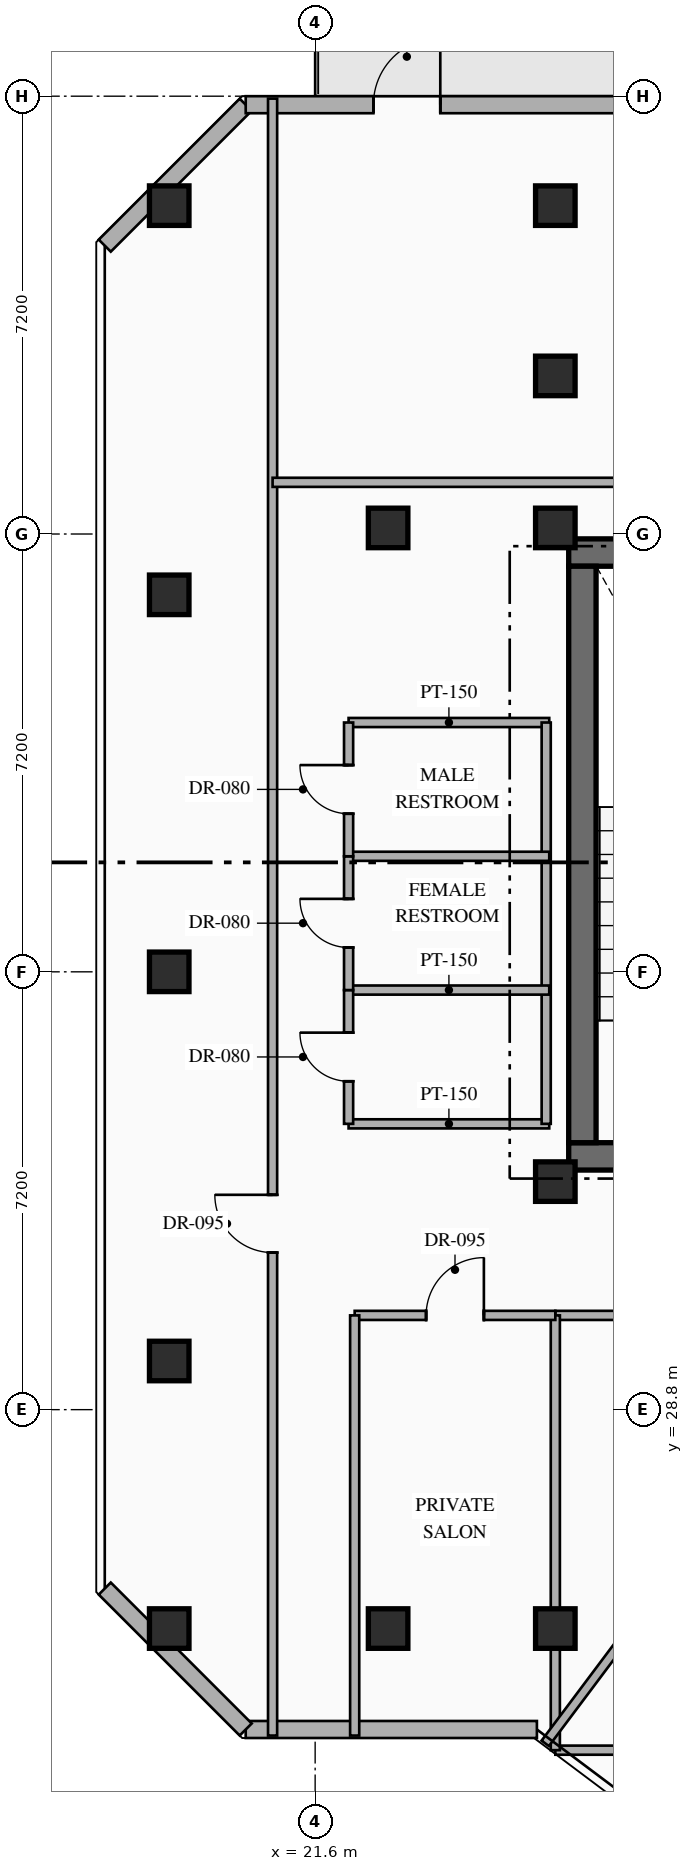
"""IFC4 building model, lengths in metres.
Left out: names, types, materials, properties, quantities, classifications, styles, units other than length and angle.
Written with IfcOpenShell. Run it as: python <this file> out.ifc"""

import sys

from ifc_helpers import new_model, si_unit, direction, frame, frame_2d, origin, origin_2d, place, context, subcontext, project, spatial, rectangle, hollow_rectangle, extrude, element, fill, save


model = new_model("IFC4")
c1 = context("Model", 3, precision=1e-05, world=origin(), true_north=direction((0.0, 1.0)))
c2 = subcontext(c1, "Body", "Model", "MODEL_VIEW")
j1 = project(units=[si_unit("LENGTHUNIT", "METRE"), si_unit("PLANEANGLEUNIT", "RADIAN")], contexts=[c1])
p1 = place(None, origin())
s1 = spatial("IfcSite", under=j1, at=p1, CompositionType="ELEMENT")
p2 = place(p1, origin())
s2 = spatial("IfcBuilding", under=s1, at=p2, CompositionType="ELEMENT")
p3 = place(p2, frame((0.0, 0.0, 239.55)))
s3 = spatial("IfcBuildingStorey", under=s2, at=p3, CompositionType="ELEMENT", Elevation=239.55)
p4 = place(p3, frame((25.77, 32.965, 0.0), z_axis=(0.0, 0.0, 1.0), x_axis=(1.0, 0.0, 0.0)))
e1 = element("IfcWall", 1, at=p4, inside=s3, PredefinedType="SHEAR", context=c2, shape_type="SweptSolid", body=[
    extrude(rectangle(XDim=7.48, YDim=0.45, at=frame_2d((3.74, 0.0))), origin(), (0.0, 0.0, 1.0), 3.6),
])
p5 = place(p4, frame((2.68, 0.0, 0.0)))
e2 = element("IfcOpeningElement", 2, at=p5, cuts=e1, PredefinedType="OPENING", context=c2, shape_type="SweptSolid", body=[
    extrude(rectangle(XDim=1.1, YDim=2.2, at=frame_2d((0.55, 1.1))), frame((0.0, 0.235, 0.0), z_axis=(0.0, -1.0, 0.0), x_axis=(1.0, 0.0, 0.0)), (0.0, 0.0, 1.0), 0.47),
])
p6 = place(p4, frame((5.43, 0.0, 0.0)))
e3 = element("IfcOpeningElement", 3, at=p6, cuts=e1, PredefinedType="OPENING", context=c2, shape_type="SweptSolid", body=[
    extrude(rectangle(XDim=1.1, YDim=2.15, at=frame_2d((0.55, 1.075))), frame((0.0, 0.235, 0.0), z_axis=(0.0, -1.0, 0.0), x_axis=(1.0, 0.0, 0.0)), (0.0, 0.0, 1.0), 0.47),
])
p7 = place(p3, frame((25.77, 42.895, 0.0), z_axis=(0.0, 0.0, 1.0), x_axis=(1.0, 0.0, 0.0)))
e4 = element("IfcWall", 4, at=p7, inside=s3, PredefinedType="SHEAR", context=c2, shape_type="SweptSolid", body=[
    extrude(rectangle(XDim=7.48, YDim=0.45, at=frame_2d((3.74, 0.0))), origin(), (0.0, 0.0, 1.0), 3.6),
])
p8 = place(p3, frame((25.995, 33.19, 0.0), z_axis=(0.0, 0.0, 1.0), x_axis=(0.0, 1.0, 0.0)))
e5 = element("IfcWall", 5, at=p8, inside=s3, PredefinedType="SHEAR", context=c2, shape_type="SweptSolid", body=[
    extrude(rectangle(XDim=9.48, YDim=0.45, at=frame_2d((4.74, 0.0))), origin(), (0.0, 0.0, 1.0), 3.6),
])
for number, where, z_axis, x_axis in (
    (6, (25.55, 32.55, 0.0), (0.0, 0.0, 1.0), (1.0, 0.0, 0.0)),
    (7, (25.55, 43.3, 0.0), (0.0, 0.0, 1.0), (1.0, 0.0, 0.0)),
    (8, (25.55, 25.2, 0.0), (0.0, 0.0, 1.0), (1.0, 0.0, 0.0)),
    (9, (25.55, 45.8, 0.0), (0.0, 0.0, 1.0), (1.0, 0.0, 0.0)),
    (10, (19.2, 48.6, 0.0), (0.0, 0.0, 1.0), (1.0, 0.0, 0.0)),
    (11, (25.55, 48.6, 0.0), (0.0, 0.0, 1.0), (1.0, 0.0, 0.0)),
    (12, (19.2, 25.2, 0.0), (0.0, 0.0, 1.0), (1.0, 0.0, 0.0)),
    (13, (19.2, 29.6, 0.0), (0.0, 0.0, 1.0), (1.0, 0.0, 0.0)),
    (14, (19.2, 42.2, 0.0), (0.0, 0.0, 1.0), (1.0, 0.0, 0.0)),
    (15, (22.8, 25.2, 0.0), (0.0, 0.0, 1.0), (1.0, 0.0, 0.0)),
    (16, (22.8, 43.3, 0.0), (0.0, 0.0, 1.0), (1.0, 0.0, 0.0)),
    (17, (19.2, 36.0, 0.0), (0.0, 0.0, 1.0), (1.0, 0.0, 0.0)),
):
    element("IfcColumn", number, at=place(p3, frame(where, z_axis=z_axis, x_axis=x_axis)), inside=s3, PredefinedType="COLUMN", context=c2, shape_type="SweptSolid", body=[
        extrude(hollow_rectangle(XDim=0.65, YDim=0.65, WallThickness=0.025, at=origin_2d()), origin(), (0.0, 0.0, 1.0), 3.6),
    ])
p9 = place(p3, frame((25.247, 23.54, 0.0), z_axis=(0.0, 0.0, 1.0), x_axis=(-1.0, 0.0, 0.0)))
e18 = element("IfcWall", 18, at=p9, inside=s3, PredefinedType="STANDARD", context=c2, shape_type="SweptSolid", body=[
    extrude(rectangle(XDim=4.789, YDim=0.28, at=frame_2d((2.395, 0.0))), origin(), (0.0, 0.0, 1.0), 3.35),
])
p10 = place(p3, frame((20.458, 23.54, 0.0), z_axis=(0.0, 0.0, 1.0), x_axis=(-0.707144017911, 0.707069542501, 0.0)))
e19 = element("IfcWall", 19, at=p10, inside=s3, PredefinedType="STANDARD", context=c2, shape_type="SweptSolid", body=[
    extrude(rectangle(XDim=3.278, YDim=0.28, at=frame_2d((1.639, 0.0))), origin(), (0.0, 0.0, 1.0), 3.35),
])
p11 = place(p3, frame((18.14, 47.942, 0.0), z_axis=(0.0, 0.0, 1.0), x_axis=(0.707106781187, 0.707106781187, 0.0)))
e20 = element("IfcWall", 20, at=p11, inside=s3, PredefinedType="STANDARD", context=c2, shape_type="SweptSolid", body=[
    extrude(rectangle(XDim=3.278, YDim=0.28, at=frame_2d((1.639, 0.0))), origin(), (0.0, 0.0, 1.0), 3.35),
])
p12 = place(p3, frame((20.458, 50.26, 0.0), z_axis=(0.0, 0.0, 1.0), x_axis=(1.0, 0.0, 0.0)))
e21 = element("IfcWall", 21, at=p12, inside=s3, PredefinedType="STANDARD", context=c2, shape_type="SweptSolid", body=[
    extrude(rectangle(XDim=22.084, YDim=0.28, at=frame_2d((11.042, 0.0))), origin(), (0.0, 0.0, 1.0), 3.35),
])
p13 = place(p12, frame((2.1, 0.0, 0.0)))
e22 = element("IfcOpeningElement", 22, at=p13, cuts=e21, PredefinedType="OPENING", context=c2, shape_type="SweptSolid", body=[
    extrude(rectangle(XDim=1.1, YDim=2.2, at=frame_2d((0.55, 1.1))), frame((0.0, 0.15, 0.0), z_axis=(0.0, -1.0, 0.0), x_axis=(1.0, 0.0, 0.0)), (0.0, 0.0, 1.0), 0.3),
])
p14 = place(p12, frame((15.663, 0.0, 0.85)))
e23 = element("IfcOpeningElement", 23, at=p14, cuts=e21, PredefinedType="OPENING", context=c2, shape_type="SweptSolid", body=[
    extrude(rectangle(XDim=1.8, YDim=2.1, at=frame_2d((0.9, 1.05))), frame((0.0, 0.15, 0.0), z_axis=(0.0, -1.0, 0.0), x_axis=(1.0, 0.0, 0.0)), (0.0, 0.0, 1.0), 0.3),
])
for number, where, z_axis, x_axis in (
    (24, (22.15, 33.5, 0.0), (0.0, 0.0, 1.0), (1.0, 0.0, 0.0)),
    (25, (22.15, 40.1, 0.0), (0.0, 0.0, 1.0), (1.0, 0.0, 0.0)),
):
    element("IfcWall", number, at=place(p3, frame(where, z_axis=z_axis, x_axis=x_axis)), inside=s3, PredefinedType="PARTITIONING", context=c2, shape_type="SweptSolid", body=[
        extrude(rectangle(XDim=3.3, YDim=0.15, at=frame_2d((1.65, 0.0))), origin(), (0.0, 0.0, 1.0), 3.35),
    ])
p15 = place(p3, frame((25.4, 33.5, 0.0), z_axis=(0.0, 0.0, 1.0), x_axis=(0.0, 1.0, 0.0)))
e26 = element("IfcWall", 26, at=p15, inside=s3, PredefinedType="PARTITIONING", context=c2, shape_type="SweptSolid", body=[
    extrude(rectangle(XDim=6.6, YDim=0.15, at=frame_2d((3.3, 0.0))), origin(), (0.0, 0.0, 1.0), 3.35),
])
for number, where, z_axis, x_axis in (
    (27, (22.15, 35.7, 0.0), (0.0, 0.0, 1.0), (1.0, 0.0, 0.0)),
    (28, (22.15, 37.9, 0.0), (0.0, 0.0, 1.0), (1.0, 0.0, 0.0)),
):
    element("IfcWall", number, at=place(p3, frame(where, z_axis=z_axis, x_axis=x_axis)), inside=s3, PredefinedType="PARTITIONING", context=c2, shape_type="SweptSolid", body=[
        extrude(rectangle(XDim=3.3, YDim=0.15, at=frame_2d((1.65, 0.0))), origin(), (0.0, 0.0, 1.0), 3.35),
    ])
p16 = place(p3, frame((22.15, 33.5, 0.0), z_axis=(0.0, 0.0, 1.0), x_axis=(0.0, 1.0, 0.0)))
e29 = element("IfcWall", 29, at=p16, inside=s3, PredefinedType="PARTITIONING", context=c2, shape_type="SweptSolid", body=[
    extrude(rectangle(XDim=2.2, YDim=0.15, at=frame_2d((1.1, 0.0))), origin(), (0.0, 0.0, 1.0), 3.35),
])
p17 = place(p16, frame((0.7, 0.0, 0.0)))
e30 = element("IfcOpeningElement", 30, at=p17, cuts=e29, PredefinedType="OPENING", context=c2, shape_type="SweptSolid", body=[
    extrude(rectangle(XDim=0.8, YDim=2.06, at=frame_2d((0.4, 1.03))), frame((0.0, 0.085, 0.0), z_axis=(0.0, -1.0, 0.0), x_axis=(1.0, 0.0, 0.0)), (0.0, 0.0, 1.0), 0.17),
])
p18 = place(p3, frame((22.15, 35.7, 0.0), z_axis=(0.0, 0.0, 1.0), x_axis=(0.0, 1.0, 0.0)))
e31 = element("IfcWall", 31, at=p18, inside=s3, PredefinedType="PARTITIONING", context=c2, shape_type="SweptSolid", body=[
    extrude(rectangle(XDim=2.2, YDim=0.15, at=frame_2d((1.1, 0.0))), origin(), (0.0, 0.0, 1.0), 3.35),
])
p19 = place(p18, frame((0.7, 0.0, 0.0)))
e32 = element("IfcOpeningElement", 32, at=p19, cuts=e31, PredefinedType="OPENING", context=c2, shape_type="SweptSolid", body=[
    extrude(rectangle(XDim=0.8, YDim=2.06, at=frame_2d((0.4, 1.03))), frame((0.0, 0.085, 0.0), z_axis=(0.0, -1.0, 0.0), x_axis=(1.0, 0.0, 0.0)), (0.0, 0.0, 1.0), 0.17),
])
p20 = place(p3, frame((22.15, 37.9, 0.0), z_axis=(0.0, 0.0, 1.0), x_axis=(0.0, 1.0, 0.0)))
e33 = element("IfcWall", 33, at=p20, inside=s3, PredefinedType="PARTITIONING", context=c2, shape_type="SweptSolid", body=[
    extrude(rectangle(XDim=2.2, YDim=0.15, at=frame_2d((1.1, 0.0))), origin(), (0.0, 0.0, 1.0), 3.35),
])
p21 = place(p20, frame((0.7, 0.0, 0.0)))
e34 = element("IfcOpeningElement", 34, at=p21, cuts=e33, PredefinedType="OPENING", context=c2, shape_type="SweptSolid", body=[
    extrude(rectangle(XDim=0.8, YDim=2.06, at=frame_2d((0.4, 1.03))), frame((0.0, 0.085, 0.0), z_axis=(0.0, -1.0, 0.0), x_axis=(1.0, 0.0, 0.0)), (0.0, 0.0, 1.0), 0.17),
])
p22 = place(p3, frame((25.55, 23.2, 0.0), z_axis=(0.0, 0.0, 1.0), x_axis=(1.0, 0.0, 0.0)))
e35 = element("IfcWall", 35, at=p22, inside=s3, PredefinedType="PARTITIONING", context=c2, shape_type="SweptSolid", body=[
    extrude(rectangle(XDim=9.4, YDim=0.15, at=frame_2d((4.7, 0.0))), origin(), (0.0, 0.0, 1.0), 3.35),
])
p23 = place(p3, frame((25.55, 30.35, 0.0), z_axis=(0.0, 0.0, 1.0), x_axis=(1.0, 0.0, 0.0)))
e36 = element("IfcWall", 36, at=p23, inside=s3, PredefinedType="PARTITIONING", context=c2, shape_type="SweptSolid", body=[
    extrude(rectangle(XDim=9.4, YDim=0.15, at=frame_2d((4.7, 0.0))), origin(), (0.0, 0.0, 1.0), 3.35),
])
p24 = place(p23, frame((7.638, 0.0, 0.0)))
e37 = element("IfcOpeningElement", 37, at=p24, cuts=e36, PredefinedType="OPENING", context=c2, shape_type="SweptSolid", body=[
    extrude(rectangle(XDim=1.0, YDim=2.15, at=frame_2d((0.5, 1.075))), frame((0.0, 0.085, 0.0), z_axis=(0.0, -1.0, 0.0), x_axis=(1.0, 0.0, 0.0)), (0.0, 0.0, 1.0), 0.17),
])
p25 = place(p3, frame((25.55, 23.2, 0.0), z_axis=(0.0, 0.0, 1.0), x_axis=(0.0, 1.0, 0.0)))
e38 = element("IfcWall", 38, at=p25, inside=s3, PredefinedType="PARTITIONING", context=c2, shape_type="SweptSolid", body=[
    extrude(rectangle(XDim=7.15, YDim=0.15, at=frame_2d((3.575, 0.0))), origin(), (0.0, 0.0, 1.0), 2.757),
])
p26 = place(p3, frame((20.9, 23.44, 0.0), z_axis=(0.0, 0.0, 1.0), x_axis=(0.0, 1.0, 0.0)))
e39 = element("IfcWall", 39, at=p26, inside=s3, PredefinedType="PARTITIONING", context=c2, shape_type="SweptSolid", body=[
    extrude(rectangle(XDim=26.92, YDim=0.15, at=frame_2d((13.46, 0.0))), origin(), (0.0, 0.0, 1.0), 3.35),
])
p27 = place(p26, frame((7.943, 0.0, 0.0)))
e40 = element("IfcOpeningElement", 40, at=p27, cuts=e39, PredefinedType="OPENING", context=c2, shape_type="SweptSolid", body=[
    extrude(rectangle(XDim=0.95, YDim=2.15, at=frame_2d((0.475, 1.075))), frame((0.0, 0.085, 0.0), z_axis=(0.0, -1.0, 0.0), x_axis=(1.0, 0.0, 0.0)), (0.0, 0.0, 1.0), 0.17),
])
p28 = place(p3, frame((20.9, 44.05, 0.0), z_axis=(0.0, 0.0, 1.0), x_axis=(1.0, 0.0, 0.0)))
e41 = element("IfcWall", 41, at=p28, inside=s3, PredefinedType="PARTITIONING", context=c2, shape_type="SweptSolid", body=[
    extrude(rectangle(XDim=24.06, YDim=0.15, at=frame_2d((12.03, 0.0))), origin(), (0.0, 0.0, 1.0), 3.35),
])
p29 = place(p28, frame((14.908, 0.0, 0.0)))
e42 = element("IfcOpeningElement", 42, at=p29, cuts=e41, PredefinedType="OPENING", context=c2, shape_type="SweptSolid", body=[
    extrude(rectangle(XDim=0.95, YDim=2.15, at=frame_2d((0.475, 1.075))), frame((0.0, 0.085, 0.0), z_axis=(0.0, -1.0, 0.0), x_axis=(1.0, 0.0, 0.0)), (0.0, 0.0, 1.0), 0.17),
])
p30 = place(p3, frame((22.25, 30.35, 0.0), z_axis=(0.0, 0.0, 1.0), x_axis=(1.0, 0.0, 0.0)))
e43 = element("IfcWall", 43, at=p30, inside=s3, PredefinedType="PARTITIONING", context=c2, shape_type="SweptSolid", body=[
    extrude(rectangle(XDim=3.3, YDim=0.15, at=frame_2d((1.65, 0.0))), origin(), (0.0, 0.0, 1.0), 3.35),
])
p31 = place(p30, frame((1.175, 0.0, 0.0)))
e44 = element("IfcOpeningElement", 44, at=p31, cuts=e43, PredefinedType="OPENING", context=c2, shape_type="SweptSolid", body=[
    extrude(rectangle(XDim=0.95, YDim=2.15, at=frame_2d((0.475, 1.075))), frame((0.0, 0.085, 0.0), z_axis=(0.0, -1.0, 0.0), x_axis=(1.0, 0.0, 0.0)), (0.0, 0.0, 1.0), 0.17),
])
p32 = place(p3, frame((22.25, 23.44, 0.0), z_axis=(0.0, 0.0, 1.0), x_axis=(0.0, 1.0, 0.0)))
e45 = element("IfcWall", 45, at=p32, inside=s3, PredefinedType="PARTITIONING", context=c2, shape_type="SweptSolid", body=[
    extrude(rectangle(XDim=6.91, YDim=0.15, at=frame_2d((3.455, 0.0))), origin(), (0.0, 0.0, 1.0), 3.35),
])
p33 = place(p3, frame((25.384, 23.312, 0.0), z_axis=(0.0, 0.0, 1.0), x_axis=(0.599990721155, 0.80000695905, 0.0)))
e46 = element("IfcWall", 46, at=p33, inside=s3, PredefinedType="PARTITIONING", context=c2, shape_type="SweptSolid", body=[
    extrude(rectangle(XDim=4.21, YDim=0.15, at=frame_2d((2.105, 0.0))), origin(), (0.0, 0.0, 1.0), 3.35),
])
p34 = place(p13, origin())
e47 = element("IfcDoor", 47, at=p34, inside=s3, OperationType="SINGLE_SWING_RIGHT", PredefinedType="DOOR", context=c2, shape_type="SweptSolid", body=[
    extrude(rectangle(XDim=1.1, YDim=2.2, at=frame_2d((0.55, 1.1))), frame((0.0, 0.025, 0.0), z_axis=(0.0, -1.0, 0.0), x_axis=(1.0, 0.0, 0.0)), (0.0, 0.0, 1.0), 0.05),
])
fill(e22, e47)
p35 = place(p17, origin())
e48 = element("IfcDoor", 48, at=p35, inside=s3, OperationType="SINGLE_SWING_RIGHT", PredefinedType="DOOR", context=c2, shape_type="SweptSolid", body=[
    extrude(rectangle(XDim=0.8, YDim=2.06, at=frame_2d((0.4, 1.03))), frame((0.0, 0.025, 0.0), z_axis=(0.0, -1.0, 0.0), x_axis=(1.0, 0.0, 0.0)), (0.0, 0.0, 1.0), 0.05),
])
fill(e30, e48)
p36 = place(p19, origin())
e49 = element("IfcDoor", 49, at=p36, inside=s3, OperationType="SINGLE_SWING_RIGHT", PredefinedType="DOOR", context=c2, shape_type="SweptSolid", body=[
    extrude(rectangle(XDim=0.8, YDim=2.06, at=frame_2d((0.4, 1.03))), frame((0.0, 0.025, 0.0), z_axis=(0.0, -1.0, 0.0), x_axis=(1.0, 0.0, 0.0)), (0.0, 0.0, 1.0), 0.05),
])
fill(e32, e49)
p37 = place(p21, origin())
e50 = element("IfcDoor", 50, at=p37, inside=s3, OperationType="SINGLE_SWING_RIGHT", PredefinedType="DOOR", context=c2, shape_type="SweptSolid", body=[
    extrude(rectangle(XDim=0.8, YDim=2.06, at=frame_2d((0.4, 1.03))), frame((0.0, 0.025, 0.0), z_axis=(0.0, -1.0, 0.0), x_axis=(1.0, 0.0, 0.0)), (0.0, 0.0, 1.0), 0.05),
])
fill(e34, e50)
p38 = place(p27, origin())
e51 = element("IfcDoor", 51, at=p38, inside=s3, OperationType="SINGLE_SWING_RIGHT", PredefinedType="DOOR", context=c2, shape_type="SweptSolid", body=[
    extrude(rectangle(XDim=0.95, YDim=2.15, at=frame_2d((0.475, 1.075))), frame((0.0, 0.025, 0.0), z_axis=(0.0, -1.0, 0.0), x_axis=(1.0, 0.0, 0.0)), (0.0, 0.0, 1.0), 0.05),
])
fill(e40, e51)
p39 = place(p31, origin())
e52 = element("IfcDoor", 52, at=p39, inside=s3, OperationType="SINGLE_SWING_RIGHT", PredefinedType="DOOR", context=c2, shape_type="SweptSolid", body=[
    extrude(rectangle(XDim=0.95, YDim=2.15, at=frame_2d((0.475, 1.075))), frame((0.0, 0.025, 0.0), z_axis=(0.0, -1.0, 0.0), x_axis=(1.0, 0.0, 0.0)), (0.0, 0.0, 1.0), 0.05),
])
fill(e44, e52)
save(model, sys.argv[1])
